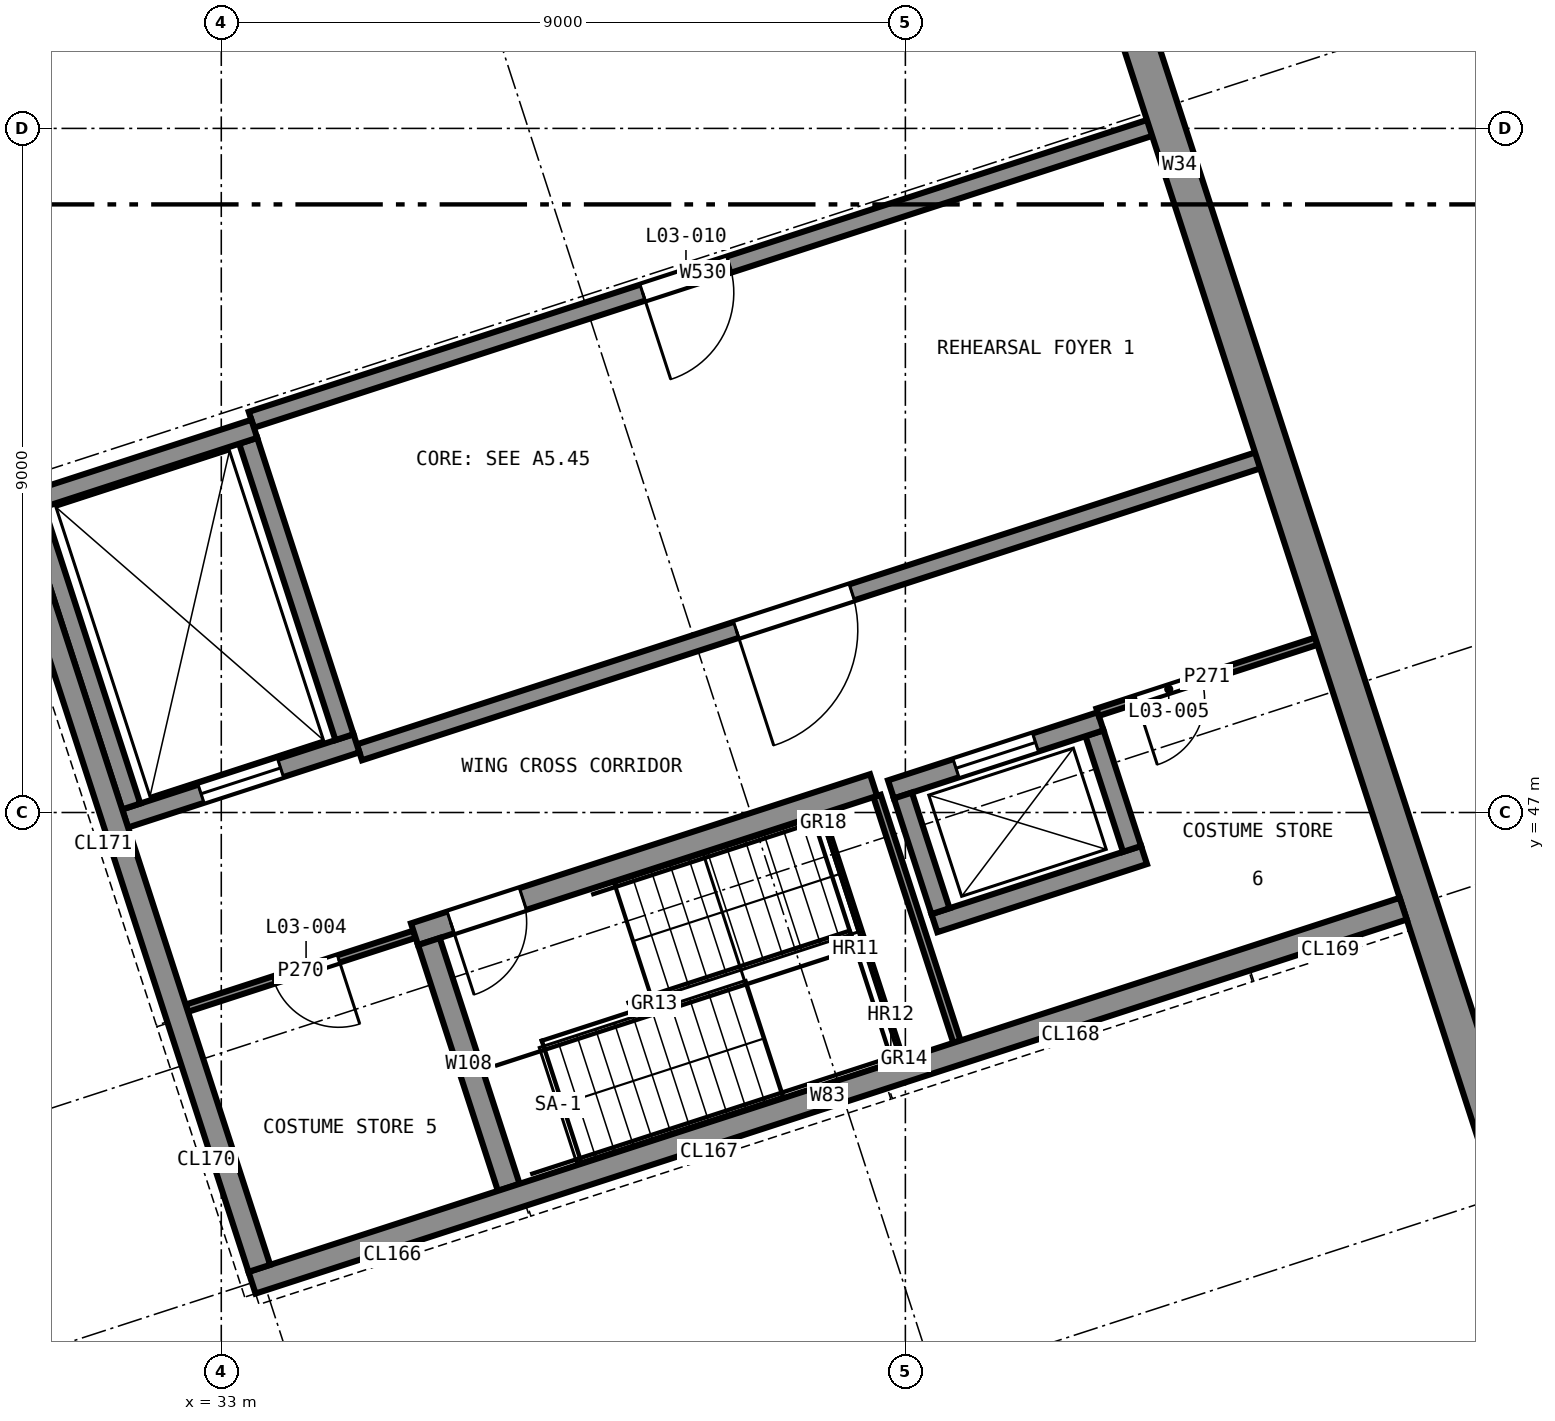
"""IFC4 building model, lengths in metres.
Left out: names, types, materials, properties, quantities, classifications, styles, units other than length and angle.
Written with IfcOpenShell. Run it as: python <this file> out.ifc"""

import sys

from ifc_helpers import new_model, si_unit, direction, frame, frame_2d, origin, place, context, subcontext, project, spatial, rectangle, extrude, element, fill, save


model = new_model("IFC4")
c1 = context("Model", 3, precision=1e-05, world=origin(), true_north=direction((0.0, 1.0)))
c2 = subcontext(c1, "Body", "Model", "MODEL_VIEW")
j1 = project(units=[si_unit("LENGTHUNIT", "METRE"), si_unit("PLANEANGLEUNIT", "RADIAN")], contexts=[c1])
p1 = place(None, origin())
s1 = spatial("IfcSite", under=j1, at=p1, CompositionType="ELEMENT")
p2 = place(p1, origin())
s2 = spatial("IfcBuilding", under=s1, at=p2, CompositionType="ELEMENT")
p3 = place(p2, frame((0.0, 0.0, 13.5)))
s3 = spatial("IfcBuildingStorey", under=s2, at=p3, CompositionType="ELEMENT", Elevation=13.5)
p4 = place(p3, frame((49.93, 42.214, 0.0), z_axis=(0.0, 0.0, 1.0), x_axis=(-0.309016215614, 0.95105676933, 0.0)))
e1 = element("IfcWall", 1, at=p4, inside=s3, PredefinedType="SHEAR", context=c2, shape_type="SweptSolid", body=[
    extrude(rectangle(XDim=27.975, YDim=0.45, at=frame_2d((13.988, 0.0))), origin(), (0.0, 0.0, 1.0), 4.0),
])
p5 = place(p3, frame((48.55, 45.735, 0.0), z_axis=(0.0, 0.0, 1.0), x_axis=(-0.951061216338, -0.309002528757, 0.0)))
e2 = element("IfcWall", 2, at=p5, inside=s3, PredefinedType="SOLIDWALL", context=c2, shape_type="SweptSolid", body=[
    extrude(rectangle(XDim=15.925, YDim=0.3, at=frame_2d((7.962, 0.0))), origin(), (0.0, 0.0, 1.0), 4.0),
])
p6 = place(p3, frame((33.501, 41.003, 0.0), z_axis=(0.0, 0.0, 1.0), x_axis=(-0.309018056255, 0.951056171269, 0.0)))
e3 = element("IfcWall", 3, at=p6, inside=s3, PredefinedType="SOLIDWALL", context=c2, shape_type="SweptSolid", body=[
    extrude(rectangle(XDim=23.7, YDim=0.3, at=frame_2d((11.85, 0.0))), origin(), (0.0, 0.0, 1.0), 4.0),
])
p7 = place(p6, frame((16.55, 0.0, 0.9)))
e4 = element("IfcOpeningElement", 4, at=p7, cuts=e3, PredefinedType="OPENING", context=c2, shape_type="SweptSolid", body=[
    extrude(rectangle(XDim=3.6, YDim=2.1, at=frame_2d((1.8, 1.05))), frame((0.0, 0.16, 0.0), z_axis=(0.0, -1.0, 0.0), x_axis=(1.0, 0.0, 0.0)), (0.0, 0.0, 1.0), 0.32),
])
p8 = place(p3, frame((41.581, 47.361, 0.0), z_axis=(0.0, 0.0, 1.0), x_axis=(-0.951058929949, -0.309009565815, 0.0)))
e5 = element("IfcWall", 5, at=p8, inside=s3, PredefinedType="SOLIDWALL", context=c2, shape_type="SweptSolid", body=[
    extrude(rectangle(XDim=6.35, YDim=0.3, at=frame_2d((3.175, 0.0))), origin(), (0.0, 0.0, 1.0), 3.7),
])
p9 = place(p8, frame((4.85, 0.0, 0.0)))
e6 = element("IfcOpeningElement", 6, at=p9, cuts=e5, PredefinedType="OPENING", context=c2, shape_type="SweptSolid", body=[
    extrude(rectangle(XDim=1.0, YDim=2.1, at=frame_2d((0.5, 1.05))), frame((0.0, 0.16, 0.0), z_axis=(0.0, -1.0, 0.0), x_axis=(1.0, 0.0, 0.0)), (0.0, 0.0, 1.0), 0.32),
])
p10 = place(p3, frame((35.731, 45.302, 0.0), z_axis=(0.0, 0.0, 1.0), x_axis=(0.308980533303, -0.951068362443, 0.0)))
e7 = element("IfcWall", 7, at=p10, inside=s3, PredefinedType="SOLIDWALL", context=c2, shape_type="SweptSolid", body=[
    extrude(rectangle(XDim=3.4, YDim=0.3, at=frame_2d((1.7, 0.0))), origin(), (0.0, 0.0, 1.0), 3.7),
])
p11 = place(p3, frame((42.382, 45.544, 0.0), z_axis=(0.0, 0.0, 1.0), x_axis=(0.951071801089, 0.308969948659, 0.0)))
e8 = element("IfcWall", 8, at=p11, inside=s3, PredefinedType="SHEAR", context=c2, shape_type="SweptSolid", body=[
    extrude(rectangle(XDim=2.9, YDim=0.25, at=frame_2d((1.45, 0.0))), origin(), (0.0, 0.0, 1.0), 4.0),
])
p12 = place(p3, frame((44.982, 46.521, 0.0), z_axis=(0.0, 0.0, 1.0), x_axis=(-0.308986014439, 0.951066581729, 0.0)))
e9 = element("IfcWall", 9, at=p12, inside=s3, PredefinedType="SHEAR", context=c2, shape_type="SweptSolid", body=[
    extrude(rectangle(XDim=1.6, YDim=0.25, at=frame_2d((0.8, 0.0))), origin(), (0.0, 0.0, 1.0), 4.0),
])
p13 = place(p3, frame((44.568, 48.2, 0.0), z_axis=(0.0, 0.0, 1.0), x_axis=(-0.951047059821, -0.309046096893, 0.0)))
e10 = element("IfcWall", 10, at=p13, inside=s3, PredefinedType="SHEAR", context=c2, shape_type="SweptSolid", body=[
    extrude(rectangle(XDim=2.9, YDim=0.25, at=frame_2d((1.45, 0.0))), origin(), (0.0, 0.0, 1.0), 4.0),
])
p14 = place(p13, frame((0.9, 0.0, 0.0)))
e11 = element("IfcOpeningElement", 11, at=p14, cuts=e10, PredefinedType="OPENING", context=c2, shape_type="SweptSolid", body=[
    extrude(rectangle(XDim=1.1, YDim=2.1, at=frame_2d((0.55, 1.05))), frame((0.0, 0.135, 0.0), z_axis=(0.0, -1.0, 0.0), x_axis=(1.0, 0.0, 0.0)), (0.0, 0.0, 1.0), 0.27),
])
p15 = place(p3, frame((41.968, 47.224, 0.0), z_axis=(0.0, 0.0, 1.0), x_axis=(0.308986014439, -0.951066581729, 0.0)))
e12 = element("IfcWall", 12, at=p15, inside=s3, PredefinedType="SHEAR", context=c2, shape_type="SweptSolid", body=[
    extrude(rectangle(XDim=1.6, YDim=0.25, at=frame_2d((0.8, 0.0))), origin(), (0.0, 0.0, 1.0), 4.0),
])
p16 = place(p3, frame((31.735, 46.922, 0.0), z_axis=(0.0, 0.0, 1.0), x_axis=(0.95104415986, 0.309055020985, 0.0)))
e13 = element("IfcWall", 13, at=p16, inside=s3, PredefinedType="SHEAR", context=c2, shape_type="SweptSolid", body=[
    extrude(rectangle(XDim=3.2, YDim=0.25, at=frame_2d((1.6, 0.0))), origin(), (0.0, 0.0, 1.0), 4.0),
])
p17 = place(p16, frame((1.05, 0.0, 0.0)))
e14 = element("IfcOpeningElement", 14, at=p17, cuts=e13, PredefinedType="OPENING", context=c2, shape_type="SweptSolid", body=[
    extrude(rectangle(XDim=1.1, YDim=2.1, at=frame_2d((0.55, 1.05))), frame((0.0, 0.135, 0.0), z_axis=(0.0, -1.0, 0.0), x_axis=(1.0, 0.0, 0.0)), (0.0, 0.0, 1.0), 0.27),
])
p18 = place(p3, frame((34.621, 47.991, 0.0), z_axis=(0.0, 0.0, 1.0), x_axis=(-0.309055103076, 0.951044133184, 0.0)))
e15 = element("IfcWall", 15, at=p18, inside=s3, PredefinedType="SHEAR", context=c2, shape_type="SweptSolid", body=[
    extrude(rectangle(XDim=4.1, YDim=0.25, at=frame_2d((2.05, 0.0))), origin(), (0.0, 0.0, 1.0), 4.0),
])
p19 = place(p3, frame((33.434, 52.048, 0.0), z_axis=(0.0, 0.0, 1.0), x_axis=(-0.951066581729, -0.308986014439, 0.0)))
e16 = element("IfcWall", 16, at=p19, inside=s3, PredefinedType="SHEAR", context=c2, shape_type="SweptSolid", body=[
    extrude(rectangle(XDim=3.2, YDim=0.25, at=frame_2d((1.6, 0.0))), origin(), (0.0, 0.0, 1.0), 4.0),
])
p20 = place(p3, frame((30.548, 50.979, 0.0), z_axis=(0.0, 0.0, 1.0), x_axis=(0.309055103076, -0.951044133184, 0.0)))
e17 = element("IfcWall", 17, at=p20, inside=s3, PredefinedType="SHEAR", context=c2, shape_type="SweptSolid", body=[
    extrude(rectangle(XDim=4.1, YDim=0.25, at=frame_2d((2.05, 0.0))), origin(), (0.0, 0.0, 1.0), 4.0),
])
p21 = place(p3, frame((33.396, 52.167, 0.0), z_axis=(0.0, 0.0, 1.0), x_axis=(0.951054448053, 0.309023359697, 0.0)))
e18 = element("IfcWall", 18, at=p21, inside=s3, PredefinedType="SOLIDWALL", context=c2, shape_type="SweptSolid", body=[
    extrude(rectangle(XDim=12.5, YDim=0.22, at=frame_2d((6.25, 0.0))), origin(), (0.0, 0.0, 1.0), 3.7),
])
p22 = place(p21, frame((5.412, 0.0, 0.0)))
e19 = element("IfcOpeningElement", 19, at=p22, cuts=e18, PredefinedType="OPENING", context=c2, shape_type="SweptSolid", body=[
    extrude(rectangle(XDim=1.2, YDim=2.1, at=frame_2d((0.6, 1.05))), frame((0.0, 0.12, 0.0), z_axis=(0.0, -1.0, 0.0), x_axis=(1.0, 0.0, 0.0)), (0.0, 0.0, 1.0), 0.24),
])
p23 = place(p3, frame((34.817, 47.792, 0.0), z_axis=(0.0, 0.0, 1.0), x_axis=(0.951054448053, 0.309023359697, 0.0)))
e20 = element("IfcWall", 20, at=p23, inside=s3, PredefinedType="SOLIDWALL", context=c2, shape_type="SweptSolid", body=[
    extrude(rectangle(XDim=12.5, YDim=0.22, at=frame_2d((6.25, 0.0))), origin(), (0.0, 0.0, 1.0), 3.7),
])
p24 = place(p23, frame((5.212, 0.0, 0.0)))
e21 = element("IfcOpeningElement", 21, at=p24, cuts=e20, PredefinedType="OPENING", context=c2, shape_type="SweptSolid", body=[
    extrude(rectangle(XDim=1.6, YDim=2.4, at=frame_2d((0.8, 1.2))), frame((0.0, 0.12, 0.0), z_axis=(0.0, -1.0, 0.0), x_axis=(1.0, 0.0, 0.0)), (0.0, 0.0, 1.0), 0.24),
])
p25 = place(p3, frame((32.546, 44.425, 0.0), z_axis=(0.0, 0.0, 1.0), x_axis=(0.951058557014, 0.309010713619, 0.0)))
e22 = element("IfcWall", 22, at=p25, inside=s3, PredefinedType="PARTITIONING", context=c2, shape_type="SweptSolid", body=[
    extrude(rectangle(XDim=3.15, YDim=0.1, at=frame_2d((1.575, 0.0))), origin(), (0.0, 0.0, 1.0), 3.7),
])
p26 = place(p25, frame((1.2, 0.0, 0.0)))
e23 = element("IfcOpeningElement", 23, at=p26, cuts=e22, PredefinedType="OPENING", context=c2, shape_type="SweptSolid", body=[
    extrude(rectangle(XDim=0.9, YDim=2.1, at=frame_2d((0.45, 1.05))), frame((0.0, 0.06, 0.0), z_axis=(0.0, -1.0, 0.0), x_axis=(1.0, 0.0, 0.0)), (0.0, 0.0, 1.0), 0.12),
])
p27 = place(p3, frame((44.53, 48.319, 0.0), z_axis=(0.0, 0.0, 1.0), x_axis=(0.951053046121, 0.30902767427, 0.0)))
e24 = element("IfcWall", 24, at=p27, inside=s3, PredefinedType="PARTITIONING", context=c2, shape_type="SweptSolid", body=[
    extrude(rectangle(XDim=3.025, YDim=0.1, at=frame_2d((1.512, 0.0))), origin(), (0.0, 0.0, 1.0), 3.7),
])
p28 = place(p27, frame((0.533, 0.0, 0.0)))
e25 = element("IfcOpeningElement", 25, at=p28, cuts=e24, PredefinedType="OPENING", context=c2, shape_type="SweptSolid", body=[
    extrude(rectangle(XDim=0.9, YDim=2.1, at=frame_2d((0.45, 1.05))), frame((0.0, 0.06, 0.0), z_axis=(0.0, -1.0, 0.0), x_axis=(1.0, 0.0, 0.0)), (0.0, 0.0, 1.0), 0.12),
])
p29 = place(p3, frame((42.678, 43.985, 0.0), z_axis=(0.0, 0.0, 1.0), x_axis=(-0.309045481752, 0.951047259714, 0.0)))
e26 = element("IfcWall", 26, at=p29, inside=s3, PredefinedType="PARTITIONING", context=c2, shape_type="SweptSolid", body=[
    extrude(rectangle(XDim=3.4, YDim=0.1, at=frame_2d((1.7, 0.0))), origin(), (0.0, 0.0, 1.0), 3.7),
])
p30 = place(p14, origin())
e27 = element("IfcDoor", 27, at=p30, inside=s3, OperationType="SLIDING_TO_LEFT", PredefinedType="DOOR", context=c2, shape_type="SweptSolid", body=[
    extrude(rectangle(XDim=1.1, YDim=2.1, at=frame_2d((0.55, 1.05))), frame((0.0, 0.025, 0.0), z_axis=(0.0, -1.0, 0.0), x_axis=(1.0, 0.0, 0.0)), (0.0, 0.0, 1.0), 0.05),
])
fill(e11, e27)
p31 = place(p17, origin())
e28 = element("IfcDoor", 28, at=p31, inside=s3, OperationType="SLIDING_TO_LEFT", PredefinedType="DOOR", context=c2, shape_type="SweptSolid", body=[
    extrude(rectangle(XDim=1.1, YDim=2.1, at=frame_2d((0.55, 1.05))), frame((0.0, 0.025, 0.0), z_axis=(0.0, -1.0, 0.0), x_axis=(1.0, 0.0, 0.0)), (0.0, 0.0, 1.0), 0.05),
])
fill(e14, e28)
p32 = place(p26, frame((0.9, 0.0, 0.0), z_axis=(0.0, 0.0, 1.0), x_axis=(-1.0, 0.0, 0.0)))
e29 = element("IfcDoor", 29, at=p32, inside=s3, OperationType="SINGLE_SWING_RIGHT", PredefinedType="DOOR", context=c2, shape_type="SweptSolid", body=[
    extrude(rectangle(XDim=0.9, YDim=2.1, at=frame_2d((0.45, 1.05))), frame((0.0, 0.025, 0.0), z_axis=(0.0, -1.0, 0.0), x_axis=(1.0, 0.0, 0.0)), (0.0, 0.0, 1.0), 0.05),
])
fill(e23, e29)
p33 = place(p28, frame((0.9, 0.0, 0.0), z_axis=(0.0, 0.0, 1.0), x_axis=(-1.0, 0.0, 0.0)))
e30 = element("IfcDoor", 30, at=p33, inside=s3, OperationType="SINGLE_SWING_LEFT", PredefinedType="DOOR", context=c2, shape_type="SweptSolid", body=[
    extrude(rectangle(XDim=0.9, YDim=2.1, at=frame_2d((0.45, 1.05))), frame((0.0, 0.025, 0.0), z_axis=(0.0, -1.0, 0.0), x_axis=(1.0, 0.0, 0.0)), (0.0, 0.0, 1.0), 0.05),
])
fill(e25, e30)
p34 = place(p24, frame((1.6, 0.0, 0.0), z_axis=(0.0, 0.0, 1.0), x_axis=(-1.0, 0.0, 0.0)))
e31 = element("IfcDoor", 31, at=p34, inside=s3, OperationType="DOUBLE_DOOR_SINGLE_SWING", PredefinedType="DOOR", context=c2, shape_type="SweptSolid", body=[
    extrude(rectangle(XDim=1.6, YDim=2.4, at=frame_2d((0.8, 1.2))), frame((0.0, 0.025, 0.0), z_axis=(0.0, -1.0, 0.0), x_axis=(1.0, 0.0, 0.0)), (0.0, 0.0, 1.0), 0.05),
])
fill(e21, e31)
p35 = place(p22, frame((1.2, 0.0, 0.0), z_axis=(0.0, 0.0, 1.0), x_axis=(-1.0, 0.0, 0.0)))
e32 = element("IfcDoor", 32, at=p35, inside=s3, OperationType="SINGLE_SWING_LEFT", PredefinedType="DOOR", context=c2, shape_type="SweptSolid", body=[
    extrude(rectangle(XDim=1.2, YDim=2.1, at=frame_2d((0.6, 1.05))), frame((0.0, 0.025, 0.0), z_axis=(0.0, -1.0, 0.0), x_axis=(1.0, 0.0, 0.0)), (0.0, 0.0, 1.0), 0.05),
])
fill(e19, e32)
p36 = place(p9, origin())
e33 = element("IfcDoor", 33, at=p36, inside=s3, OperationType="SINGLE_SWING_LEFT", PredefinedType="DOOR", context=c2, shape_type="SweptSolid", body=[
    extrude(rectangle(XDim=1.0, YDim=2.1, at=frame_2d((0.5, 1.05))), frame((0.0, 0.025, 0.0), z_axis=(0.0, -1.0, 0.0), x_axis=(1.0, 0.0, 0.0)), (0.0, 0.0, 1.0), 0.05),
])
fill(e6, e33)
save(model, sys.argv[1])
